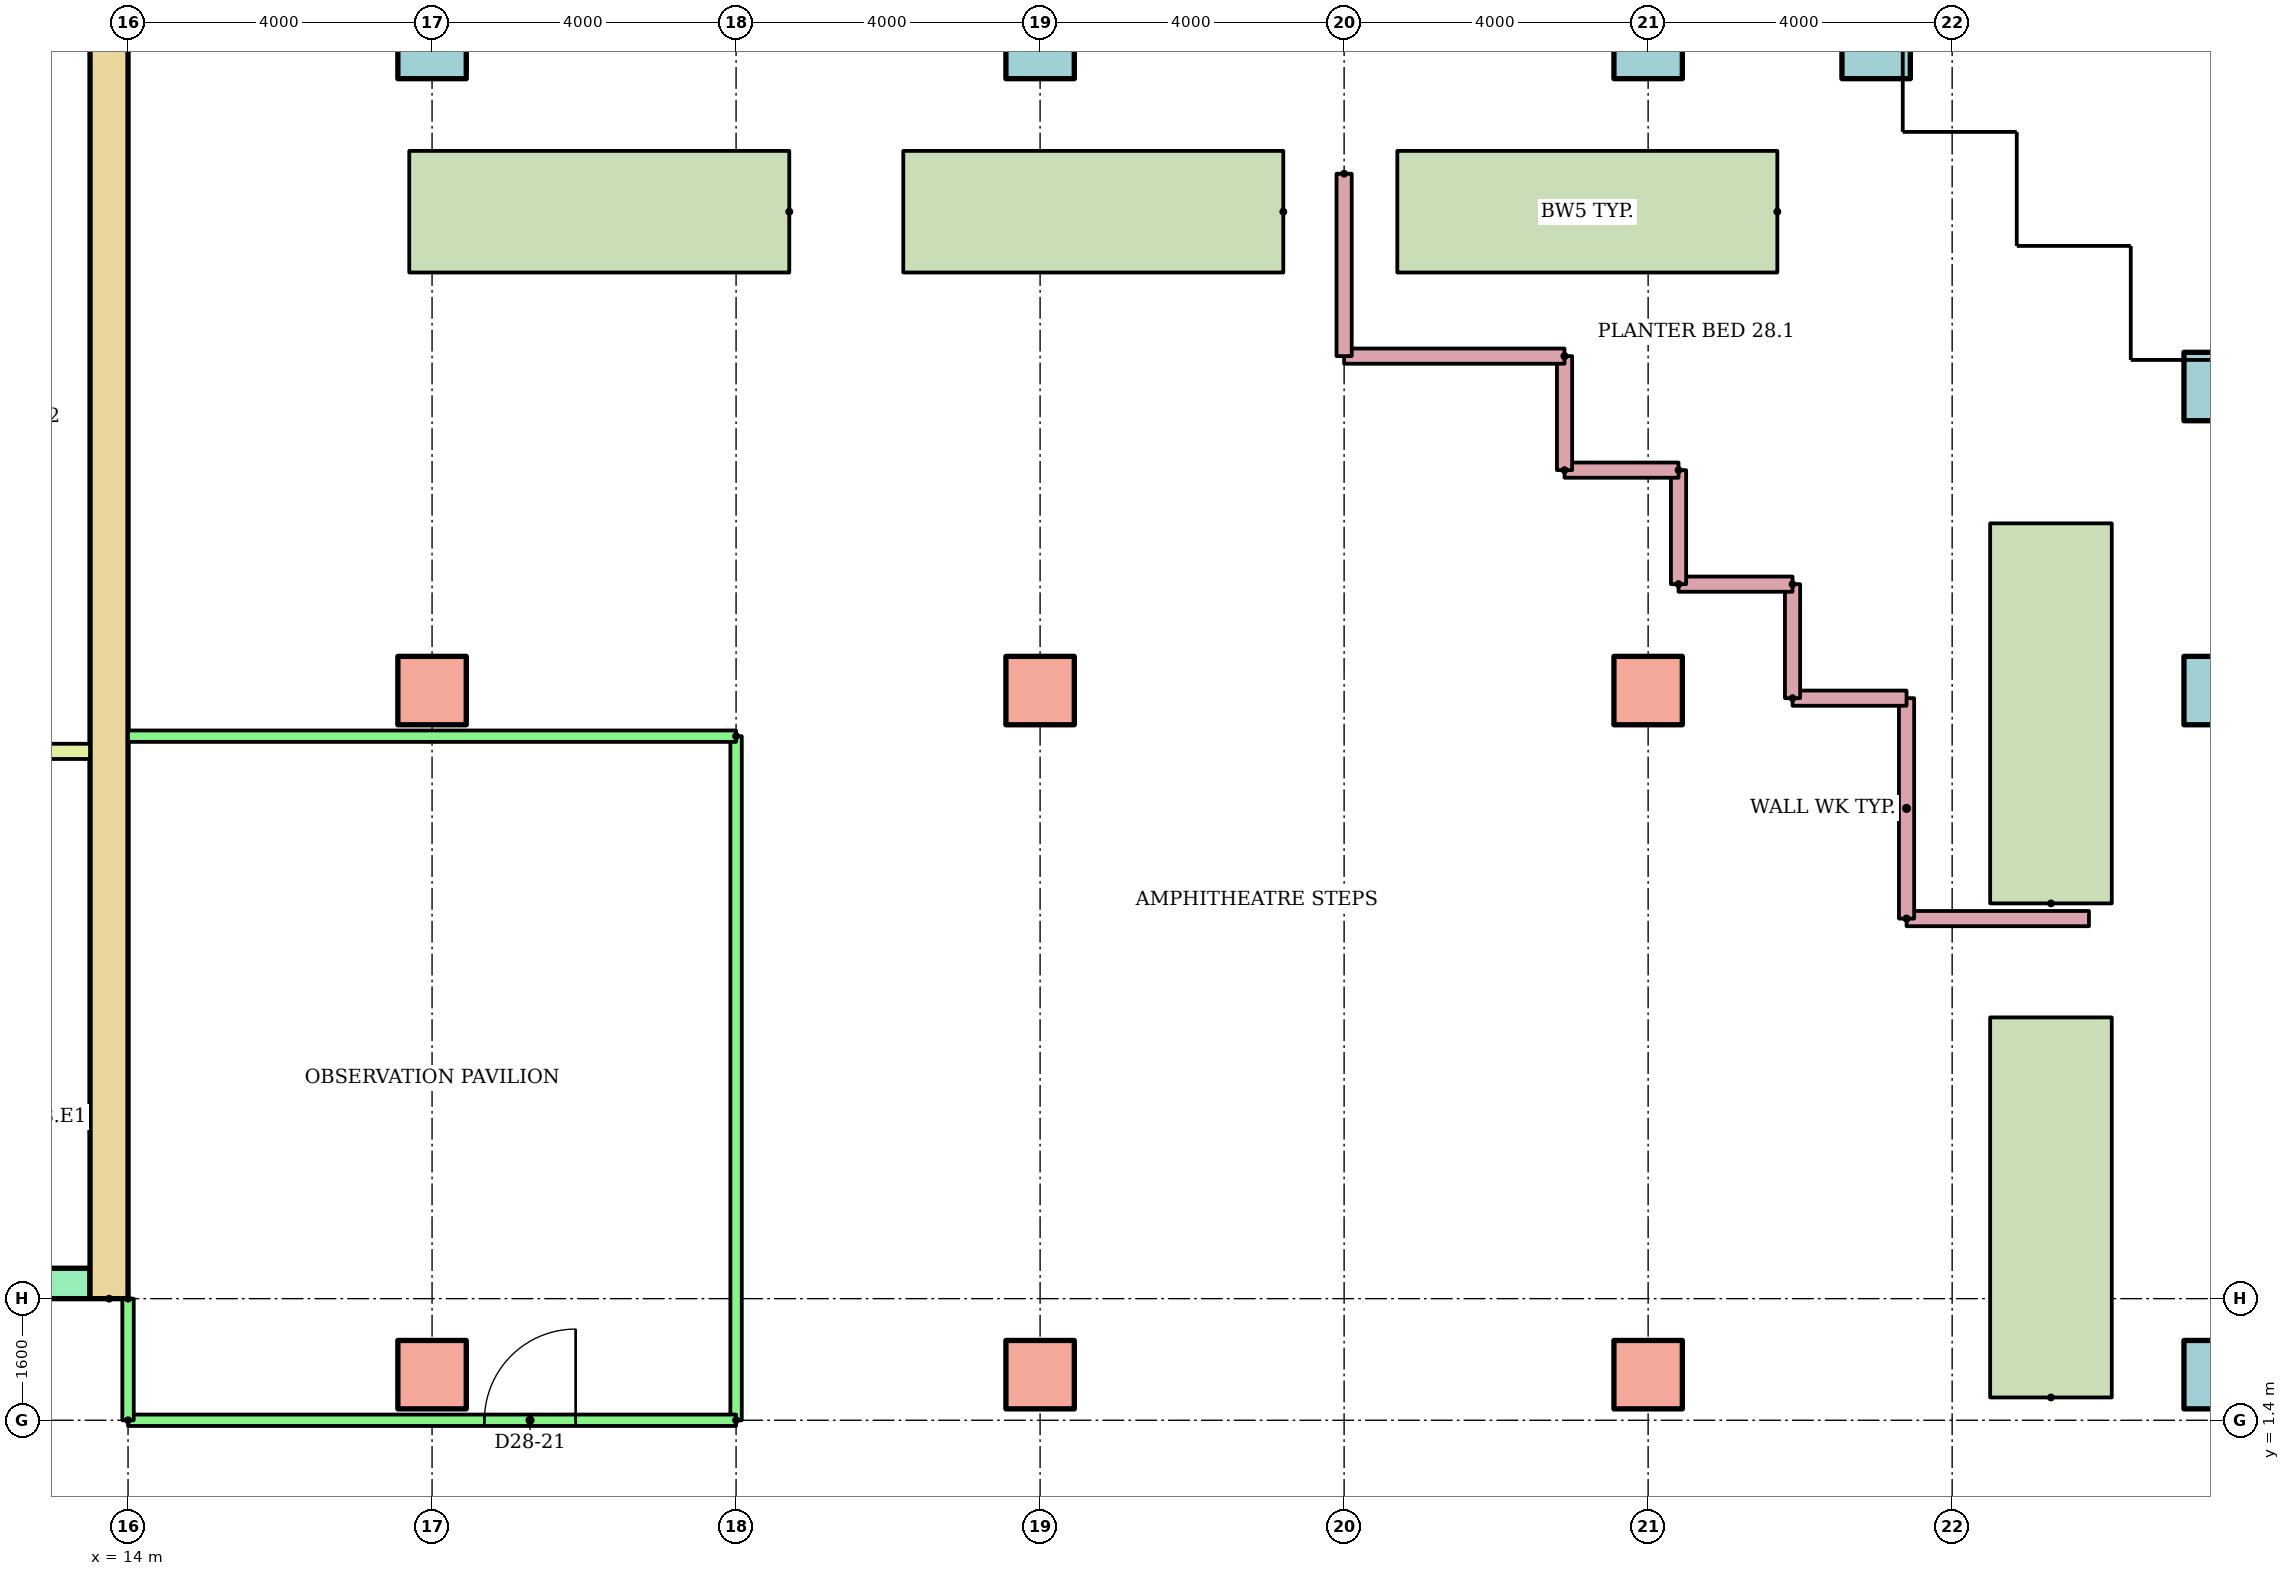
"""IFC4 building model, lengths in metres.
Left out: names, types, materials, properties, quantities, classifications, styles, units other than length and angle.
Written with IfcOpenShell. Run it as: python <this file> out.ifc"""

import sys

from ifc_helpers import new_model, si_unit, direction, frame, frame_2d, origin, origin_2d, place, context, subcontext, project, spatial, rectangle, hollow_rectangle, extrude, element, fill, save


model = new_model("IFC4")
c1 = context("Model", 3, precision=1e-05, world=origin(), true_north=direction((0.0, 1.0)))
c2 = subcontext(c1, "Body", "Model", "MODEL_VIEW")
j1 = project(units=[si_unit("LENGTHUNIT", "METRE"), si_unit("PLANEANGLEUNIT", "RADIAN")], contexts=[c1])
p1 = place(None, origin())
s1 = spatial("IfcSite", under=j1, at=p1, CompositionType="ELEMENT")
p2 = place(p1, origin())
s2 = spatial("IfcBuilding", under=s1, at=p2, CompositionType="ELEMENT")
p3 = place(p2, frame((0.0, 0.0, 106.3)))
s3 = spatial("IfcBuildingStorey", under=s2, at=p3, CompositionType="ELEMENT", Elevation=106.3)
for number, where in (
    (1, (18.0, 2.0, 0.0)),
    (2, (26.0, 2.0, 0.0)),
):
    element("IfcColumn", number, at=place(p3, frame(where)), inside=s3, PredefinedType="COLUMN", context=c2, shape_type="SweptSolid", body=[
        extrude(rectangle(XDim=0.9, YDim=0.9, at=origin_2d()), origin(), (0.0, 0.0, 1.0), 9.6),
    ])
p4 = place(p3, frame((34.0, 2.0, 0.0)))
e3 = element("IfcColumn", 3, at=p4, inside=s3, PredefinedType="COLUMN", context=c2, shape_type="SweptSolid", body=[
    extrude(rectangle(XDim=0.9, YDim=0.9, at=origin_2d()), origin(), (0.0, 0.0, 1.0), 8.8),
])
p5 = place(p3, frame((41.5, 2.0, 0.0)))
e4 = element("IfcColumn", 4, at=p5, inside=s3, PredefinedType="COLUMN", context=c2, shape_type="SweptSolid", body=[
    extrude(hollow_rectangle(XDim=0.9, YDim=0.9, WallThickness=0.045, at=origin_2d()), origin(), (0.0, 0.0, 1.0), 9.25),
])
for number, where in (
    (5, (18.0, 11.0, 0.0)),
    (6, (26.0, 11.0, 0.0)),
):
    element("IfcColumn", number, at=place(p3, frame(where)), inside=s3, PredefinedType="COLUMN", context=c2, shape_type="SweptSolid", body=[
        extrude(rectangle(XDim=0.9, YDim=0.9, at=origin_2d()), origin(), (0.0, 0.0, 1.0), 9.6),
    ])
p6 = place(p3, frame((34.0, 11.0, 0.0)))
e7 = element("IfcColumn", 7, at=p6, inside=s3, PredefinedType="COLUMN", context=c2, shape_type="SweptSolid", body=[
    extrude(rectangle(XDim=0.9, YDim=0.9, at=origin_2d()), origin(), (0.0, 0.0, 1.0), 8.8),
])
for number, where in (
    (8, (41.5, 11.0, 0.0)),
    (9, (41.5, 15.0, 0.0)),
):
    element("IfcColumn", number, at=place(p3, frame(where)), inside=s3, PredefinedType="COLUMN", context=c2, shape_type="SweptSolid", body=[
        extrude(hollow_rectangle(XDim=0.9, YDim=0.9, WallThickness=0.045, at=origin_2d()), origin(), (0.0, 0.0, 1.0), 9.25),
    ])
for number, where in (
    (10, (18.0, 19.5, 0.0)),
    (11, (26.0, 19.5, 0.0)),
):
    element("IfcColumn", number, at=place(p3, frame(where)), inside=s3, PredefinedType="COLUMN", context=c2, shape_type="SweptSolid", body=[
        extrude(hollow_rectangle(XDim=0.9, YDim=0.9, WallThickness=0.045, at=origin_2d()), origin(), (0.0, 0.0, 1.0), 9.6),
    ])
p7 = place(p3, frame((34.0, 19.5, 0.0)))
e12 = element("IfcColumn", 12, at=p7, inside=s3, PredefinedType="COLUMN", context=c2, shape_type="SweptSolid", body=[
    extrude(hollow_rectangle(XDim=0.9, YDim=0.9, WallThickness=0.045, at=origin_2d()), origin(), (0.0, 0.0, 1.0), 8.8),
])
p8 = place(p3, frame((37.0, 19.5, 0.0)))
e13 = element("IfcColumn", 13, at=p8, inside=s3, PredefinedType="COLUMN", context=c2, shape_type="SweptSolid", body=[
    extrude(hollow_rectangle(XDim=0.9, YDim=0.9, WallThickness=0.045, at=origin_2d()), origin(), (0.0, 0.0, 1.0), 9.25),
])
for number, where, z_axis, x_axis in (
    (14, (35.7, 17.3, 0.0), (0.0, 0.0, 1.0), (-1.0, 0.0, 0.0)),
    (15, (29.2, 17.3, 0.0), (0.0, 0.0, 1.0), (-1.0, 0.0, 0.0)),
    (16, (22.7, 17.3, 0.0), (0.0, 0.0, 1.0), (-1.0, 0.0, 0.0)),
    (17, (39.3, 1.7, 0.0), (0.0, 0.0, 1.0), (0.0, 1.0, 0.0)),
    (18, (39.3, 8.2, 0.0), (0.0, 0.0, 1.0), (0.0, 1.0, 0.0)),
):
    element("IfcWall", number, at=place(p3, frame(where, z_axis=z_axis, x_axis=x_axis)), inside=s3, PredefinedType="STANDARD", context=c2, shape_type="SweptSolid", body=[
        extrude(rectangle(XDim=5.0, YDim=1.6, at=frame_2d((2.5, 0.0))), origin(), (0.0, 0.0, 1.0), 0.8),
    ])
p9 = place(p3, frame((13.75, 3.0, 0.0), z_axis=(0.0, 0.0, 1.0), x_axis=(0.0, 1.0, 0.0)))
e19 = element("IfcWall", 19, at=p9, inside=s3, PredefinedType="SHEAR", context=c2, shape_type="SweptSolid", body=[
    extrude(rectangle(XDim=17.0, YDim=0.5, at=frame_2d((8.5, 0.0))), origin(), (0.0, 0.0, 1.0), 8.8),
])
p10 = place(p3, frame((-13.5, 3.2, 0.0)))
e20 = element("IfcWall", 20, at=p10, inside=s3, PredefinedType="SHEAR", context=c2, shape_type="SweptSolid", body=[
    extrude(rectangle(XDim=27.0, YDim=0.4, at=frame_2d((13.5, 0.0))), origin(), (0.0, 0.0, 1.0), 8.8),
])
p11 = place(p10, frame((6.861, 0.0, 0.0)))
e21 = element("IfcOpeningElement", 21, at=p11, cuts=e20, PredefinedType="OPENING", context=c2, shape_type="SweptSolid", body=[
    extrude(rectangle(XDim=1.1, YDim=2.1, at=frame_2d((0.55, 1.05))), frame((0.0, 0.21, 0.0), z_axis=(0.0, -1.0, 0.0), x_axis=(1.0, 0.0, 0.0)), (0.0, 0.0, 1.0), 0.42),
])
p12 = place(p10, frame((9.906, 0.0, 0.0)))
e22 = element("IfcOpeningElement", 22, at=p12, cuts=e20, PredefinedType="OPENING", context=c2, shape_type="SweptSolid", body=[
    extrude(rectangle(XDim=1.1, YDim=2.1, at=frame_2d((0.55, 1.05))), frame((0.0, 0.21, 0.0), z_axis=(0.0, -1.0, 0.0), x_axis=(1.0, 0.0, 0.0)), (0.0, 0.0, 1.0), 0.42),
])
p13 = place(p10, frame((15.994, 0.0, 0.0)))
e23 = element("IfcOpeningElement", 23, at=p13, cuts=e20, PredefinedType="OPENING", context=c2, shape_type="SweptSolid", body=[
    extrude(rectangle(XDim=1.1, YDim=2.1, at=frame_2d((0.55, 1.05))), frame((0.0, 0.21, 0.0), z_axis=(0.0, -1.0, 0.0), x_axis=(1.0, 0.0, 0.0)), (0.0, 0.0, 1.0), 0.42),
])
p14 = place(p10, frame((19.039, 0.0, 0.0)))
e24 = element("IfcOpeningElement", 24, at=p14, cuts=e20, PredefinedType="OPENING", context=c2, shape_type="SweptSolid", body=[
    extrude(rectangle(XDim=1.1, YDim=2.1, at=frame_2d((0.55, 1.05))), frame((0.0, 0.21, 0.0), z_axis=(0.0, -1.0, 0.0), x_axis=(1.0, 0.0, 0.0)), (0.0, 0.0, 1.0), 0.42),
])
p15 = place(p10, frame((12.6, 0.0, 0.0)))
e25 = element("IfcOpeningElement", 25, at=p15, cuts=e20, PredefinedType="OPENING", context=c2, shape_type="SweptSolid", body=[
    extrude(rectangle(XDim=1.8, YDim=2.1, at=frame_2d((0.9, 1.05))), frame((0.0, 0.21, 0.0), z_axis=(0.0, -1.0, 0.0), x_axis=(1.0, 0.0, 0.0)), (0.0, 0.0, 1.0), 0.42),
])
p16 = place(p3, frame((9.6, 10.2, 0.0)))
e26 = element("IfcWall", 26, at=p16, inside=s3, PredefinedType="PARTITIONING", context=c2, shape_type="SweptSolid", body=[
    extrude(rectangle(XDim=3.9, YDim=0.2, at=frame_2d((1.95, 0.0))), origin(), (0.0, 0.0, 1.0), 8.8),
])
p17 = place(p3, frame((22.0, 1.4, 0.0), z_axis=(0.0, 0.0, 1.0), x_axis=(0.0, 1.0, 0.0)))
e27 = element("IfcWall", 27, at=p17, inside=s3, PredefinedType="PARTITIONING", context=c2, shape_type="SweptSolid", body=[
    extrude(rectangle(XDim=9.0, YDim=0.15, at=frame_2d((4.5, 0.0))), origin(), (0.0, 0.0, 1.0), 8.8),
])
p18 = place(p3, frame((22.0, 10.4, 0.0), z_axis=(0.0, 0.0, 1.0), x_axis=(-1.0, 0.0, 0.0)))
e28 = element("IfcWall", 28, at=p18, inside=s3, PredefinedType="PARTITIONING", context=c2, shape_type="SweptSolid", body=[
    extrude(rectangle(XDim=8.0, YDim=0.15, at=frame_2d((4.0, 0.0))), origin(), (0.0, 0.0, 1.0), 8.8),
])
p19 = place(p3, frame((14.0, 1.4, 0.0)))
e29 = element("IfcWall", 29, at=p19, inside=s3, PredefinedType="PARTITIONING", context=c2, shape_type="SweptSolid", body=[
    extrude(rectangle(XDim=8.0, YDim=0.15, at=frame_2d((4.0, 0.0))), origin(), (0.0, 0.0, 1.0), 8.8),
])
p20 = place(p19, frame((4.689, 0.0, 0.0)))
e30 = element("IfcOpeningElement", 30, at=p20, cuts=e29, PredefinedType="OPENING", context=c2, shape_type="SweptSolid", body=[
    extrude(rectangle(XDim=1.2, YDim=2.1, at=frame_2d((0.6, 1.05))), frame((0.0, 0.085, 0.0), z_axis=(0.0, -1.0, 0.0), x_axis=(1.0, 0.0, 0.0)), (0.0, 0.0, 1.0), 0.17),
])
p21 = place(p3, frame((14.0, 3.0, 0.0), z_axis=(0.0, 0.0, 1.0), x_axis=(0.0, -1.0, 0.0)))
e31 = element("IfcWall", 31, at=p21, inside=s3, PredefinedType="PARTITIONING", context=c2, shape_type="SweptSolid", body=[
    extrude(rectangle(XDim=1.6, YDim=0.15, at=frame_2d((0.8, 0.0))), origin(), (0.0, 0.0, 1.0), 8.8),
])
p22 = place(p3, frame((37.4, 8.0, 0.0)))
e32 = element("IfcWall", 32, at=p22, inside=s3, PredefinedType="PARTITIONING", context=c2, shape_type="SweptSolid", body=[
    extrude(rectangle(XDim=2.4, YDim=0.2, at=frame_2d((1.2, 0.0))), origin(), (0.0, 0.0, 1.0), 0.9),
])
p23 = place(p3, frame((37.4, 8.0, 0.0), z_axis=(0.0, 0.0, 1.0), x_axis=(0.0, 1.0, 0.0)))
e33 = element("IfcWall", 33, at=p23, inside=s3, PredefinedType="PARTITIONING", context=c2, shape_type="SweptSolid", body=[
    extrude(rectangle(XDim=2.9, YDim=0.2, at=frame_2d((1.45, 0.0))), origin(), (0.0, 0.0, 1.0), 0.9),
])
p24 = place(p3, frame((35.9, 10.9, 0.0)))
e34 = element("IfcWall", 34, at=p24, inside=s3, PredefinedType="PARTITIONING", context=c2, shape_type="SweptSolid", body=[
    extrude(rectangle(XDim=1.5, YDim=0.2, at=frame_2d((0.75, 0.0))), origin(), (0.0, 0.0, 1.0), 0.9),
])
p25 = place(p3, frame((35.9, 12.4, 0.0), z_axis=(0.0, 0.0, 1.0), x_axis=(0.0, -1.0, 0.0)))
e35 = element("IfcWall", 35, at=p25, inside=s3, PredefinedType="PARTITIONING", context=c2, shape_type="SweptSolid", body=[
    extrude(rectangle(XDim=1.5, YDim=0.2, at=frame_2d((0.75, 0.0))), origin(), (0.0, 0.0, 1.0), 0.9),
])
p26 = place(p3, frame((34.4, 12.4, 0.0)))
e36 = element("IfcWall", 36, at=p26, inside=s3, PredefinedType="PARTITIONING", context=c2, shape_type="SweptSolid", body=[
    extrude(rectangle(XDim=1.5, YDim=0.2, at=frame_2d((0.75, 0.0))), origin(), (0.0, 0.0, 1.0), 0.9),
])
p27 = place(p3, frame((34.4, 13.9, 0.0), z_axis=(0.0, 0.0, 1.0), x_axis=(0.0, -1.0, 0.0)))
e37 = element("IfcWall", 37, at=p27, inside=s3, PredefinedType="PARTITIONING", context=c2, shape_type="SweptSolid", body=[
    extrude(rectangle(XDim=1.5, YDim=0.2, at=frame_2d((0.75, 0.0))), origin(), (0.0, 0.0, 1.0), 0.9),
])
p28 = place(p3, frame((32.9, 13.9, 0.0)))
e38 = element("IfcWall", 38, at=p28, inside=s3, PredefinedType="PARTITIONING", context=c2, shape_type="SweptSolid", body=[
    extrude(rectangle(XDim=1.5, YDim=0.2, at=frame_2d((0.75, 0.0))), origin(), (0.0, 0.0, 1.0), 0.9),
])
p29 = place(p3, frame((32.9, 15.4, 0.0), z_axis=(0.0, 0.0, 1.0), x_axis=(0.0, -1.0, 0.0)))
e39 = element("IfcWall", 39, at=p29, inside=s3, PredefinedType="PARTITIONING", context=c2, shape_type="SweptSolid", body=[
    extrude(rectangle(XDim=1.5, YDim=0.2, at=frame_2d((0.75, 0.0))), origin(), (0.0, 0.0, 1.0), 0.9),
])
p30 = place(p3, frame((32.9, 15.4, 0.0), z_axis=(0.0, 0.0, 1.0), x_axis=(-1.0, 0.0, 0.0)))
e40 = element("IfcWall", 40, at=p30, inside=s3, PredefinedType="PARTITIONING", context=c2, shape_type="SweptSolid", body=[
    extrude(rectangle(XDim=2.9, YDim=0.2, at=frame_2d((1.45, 0.0))), origin(), (0.0, 0.0, 1.0), 0.9),
])
p31 = place(p3, frame((30.0, 17.8, 0.0), z_axis=(0.0, 0.0, 1.0), x_axis=(0.0, -1.0, 0.0)))
e41 = element("IfcWall", 41, at=p31, inside=s3, PredefinedType="PARTITIONING", context=c2, shape_type="SweptSolid", body=[
    extrude(rectangle(XDim=2.4, YDim=0.2, at=frame_2d((1.2, 0.0))), origin(), (0.0, 0.0, 1.0), 0.9),
])
p32 = place(p20, origin())
e42 = element("IfcDoor", 42, at=p32, inside=s3, OperationType="SINGLE_SWING_RIGHT", PredefinedType="DOOR", context=c2, shape_type="SweptSolid", body=[
    extrude(rectangle(XDim=1.2, YDim=2.1, at=frame_2d((0.6, 1.05))), frame((0.0, 0.025, 0.0), z_axis=(0.0, -1.0, 0.0), x_axis=(1.0, 0.0, 0.0)), (0.0, 0.0, 1.0), 0.05),
])
fill(e30, e42)
save(model, sys.argv[1])
